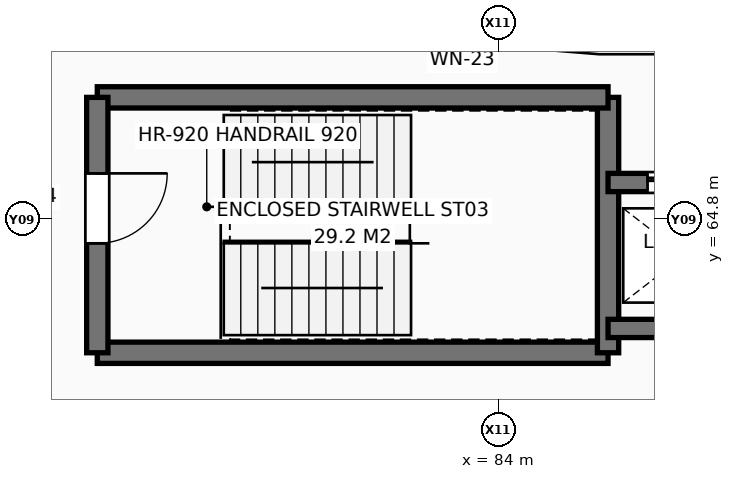
"""IFC4 building model, lengths in metres.
Left out: names, types, materials, properties, quantities, classifications, styles, units other than length and angle.
Written with IfcOpenShell. Run it as: python <this file> out.ifc"""

import sys

from ifc_helpers import new_model, si_unit, direction, frame, frame_2d, origin, place, context, subcontext, project, spatial, rectangle, extrude, element, fill, save


model = new_model("IFC4")
c1 = context("Model", 3, precision=1e-05, world=origin(), true_north=direction((0.0, 1.0)))
c2 = subcontext(c1, "Body", "Model", "MODEL_VIEW")
j1 = project(units=[si_unit("LENGTHUNIT", "METRE"), si_unit("PLANEANGLEUNIT", "RADIAN")], contexts=[c1])
p1 = place(None, origin())
s1 = spatial("IfcSite", under=j1, at=p1, CompositionType="ELEMENT")
p2 = place(p1, origin())
s2 = spatial("IfcBuilding", under=s1, at=p2, CompositionType="ELEMENT")
p3 = place(p2, frame((0.0, 0.0, 5.4)))
s3 = spatial("IfcBuildingStorey", under=s2, at=p3, CompositionType="ELEMENT", Elevation=5.4)
p4 = place(p3, frame((79.288, 68.1, 0.0), z_axis=(0.0, 0.0, 1.0), x_axis=(0.999198380478, -0.040032442472, 0.0)))
e1 = element("IfcWall", 1, at=p4, inside=s3, PredefinedType="SOLIDWALL", context=c2, shape_type="SweptSolid", body=[
    extrude(rectangle(XDim=12.868, YDim=0.34, at=frame_2d((6.434, 0.0))), origin(), (0.0, 0.0, 1.0), 3.387),
])
p5 = place(p4, frame((3.689, 0.0, 0.9)))
e2 = element("IfcOpeningElement", 2, at=p5, cuts=e1, PredefinedType="OPENING", context=c2, shape_type="SweptSolid", body=[
    extrude(rectangle(XDim=0.9, YDim=2.2, at=frame_2d((0.45, 1.1))), frame((0.0, 0.18, 0.0), z_axis=(0.0, -1.0, 0.0), x_axis=(1.0, 0.0, 0.0)), (0.0, 0.0, 1.0), 0.36),
])
p6 = place(p4, frame((8.279, 0.0, 0.9)))
e3 = element("IfcOpeningElement", 3, at=p6, cuts=e1, PredefinedType="OPENING", context=c2, shape_type="SweptSolid", body=[
    extrude(rectangle(XDim=0.9, YDim=2.2, at=frame_2d((0.45, 1.1))), frame((0.0, 0.18, 0.0), z_axis=(0.0, -1.0, 0.0), x_axis=(1.0, 0.0, 0.0)), (0.0, 0.0, 1.0), 0.36),
])
p7 = place(p3, frame((77.4, 62.6, 0.0), z_axis=(0.0, 0.0, 1.0), x_axis=(1.0, 0.0, 0.0)))
e4 = element("IfcWall", 4, at=p7, inside=s3, PredefinedType="SHEAR", context=c2, shape_type="SweptSolid", body=[
    extrude(rectangle(XDim=8.4, YDim=0.35, at=frame_2d((4.2, 0.0))), origin(), (0.0, 0.0, 1.0), 3.92),
])
p8 = place(p3, frame((85.8, 62.6, 0.0), z_axis=(0.0, 0.0, 1.0), x_axis=(0.0, 1.0, 0.0)))
e5 = element("IfcWall", 5, at=p8, inside=s3, PredefinedType="SHEAR", context=c2, shape_type="SweptSolid", body=[
    extrude(rectangle(XDim=4.2, YDim=0.35, at=frame_2d((2.1, 0.0))), origin(), (0.0, 0.0, 1.0), 3.92),
])
p9 = place(p3, frame((85.8, 66.8, 0.0), z_axis=(0.0, 0.0, 1.0), x_axis=(-1.0, 0.0, 0.0)))
e6 = element("IfcWall", 6, at=p9, inside=s3, PredefinedType="SHEAR", context=c2, shape_type="SweptSolid", body=[
    extrude(rectangle(XDim=8.4, YDim=0.35, at=frame_2d((4.2, 0.0))), origin(), (0.0, 0.0, 1.0), 3.92),
])
p10 = place(p3, frame((77.4, 66.8, 0.0), z_axis=(0.0, 0.0, 1.0), x_axis=(0.0, -1.0, 0.0)))
e7 = element("IfcWall", 7, at=p10, inside=s3, PredefinedType="SHEAR", context=c2, shape_type="SweptSolid", body=[
    extrude(rectangle(XDim=4.2, YDim=0.35, at=frame_2d((2.1, 0.0))), origin(), (0.0, 0.0, 1.0), 3.92),
])
p11 = place(p10, frame((1.25, 0.0, 0.0)))
e8 = element("IfcOpeningElement", 8, at=p11, cuts=e7, PredefinedType="OPENING", context=c2, shape_type="SweptSolid", body=[
    extrude(rectangle(XDim=1.15, YDim=2.2, at=frame_2d((0.575, 1.1))), frame((0.0, 0.185, 0.0), z_axis=(0.0, -1.0, 0.0), x_axis=(1.0, 0.0, 0.0)), (0.0, 0.0, 1.0), 0.37),
])
p12 = place(p3, frame((88.3, 65.4, 0.0), z_axis=(0.0, 0.0, 1.0), x_axis=(-1.0, 0.0, 0.0)))
e9 = element("IfcWall", 9, at=p12, inside=s3, PredefinedType="SHEAR", context=c2, shape_type="SweptSolid", body=[
    extrude(rectangle(XDim=2.5, YDim=0.3, at=frame_2d((1.25, 0.0))), origin(), (0.0, 0.0, 1.0), 3.92),
])
p13 = place(p12, frame((0.65, 0.0, 0.0)))
e10 = element("IfcOpeningElement", 10, at=p13, cuts=e9, PredefinedType="OPENING", context=c2, shape_type="SweptSolid", body=[
    extrude(rectangle(XDim=1.2, YDim=2.25, at=frame_2d((0.6, 1.125))), frame((0.0, 0.16, 0.0), z_axis=(0.0, -1.0, 0.0), x_axis=(1.0, 0.0, 0.0)), (0.0, 0.0, 1.0), 0.32),
])
p14 = place(p3, frame((85.8, 63.0, 0.0), z_axis=(0.0, 0.0, 1.0), x_axis=(1.0, 0.0, 0.0)))
e11 = element("IfcWall", 11, at=p14, inside=s3, PredefinedType="SHEAR", context=c2, shape_type="SweptSolid", body=[
    extrude(rectangle(XDim=2.5, YDim=0.3, at=frame_2d((1.25, 0.0))), origin(), (0.0, 0.0, 1.0), 3.92),
])
p15 = place(p11, origin())
e12 = element("IfcDoor", 12, at=p15, inside=s3, OperationType="SINGLE_SWING_LEFT", PredefinedType="DOOR", context=c2, shape_type="SweptSolid", body=[
    extrude(rectangle(XDim=1.15, YDim=2.2, at=frame_2d((0.575, 1.1))), frame((0.0, 0.025, 0.0), z_axis=(0.0, -1.0, 0.0), x_axis=(1.0, 0.0, 0.0)), (0.0, 0.0, 1.0), 0.05),
])
fill(e8, e12)
p16 = place(p13, origin())
e13 = element("IfcDoor", 13, at=p16, inside=s3, OperationType="SLIDING_TO_LEFT", PredefinedType="DOOR", context=c2, shape_type="SweptSolid", body=[
    extrude(rectangle(XDim=1.2, YDim=2.25, at=frame_2d((0.6, 1.125))), frame((0.0, 0.025, 0.0), z_axis=(0.0, -1.0, 0.0), x_axis=(1.0, 0.0, 0.0)), (0.0, 0.0, 1.0), 0.05),
])
fill(e10, e13)
save(model, sys.argv[1])
